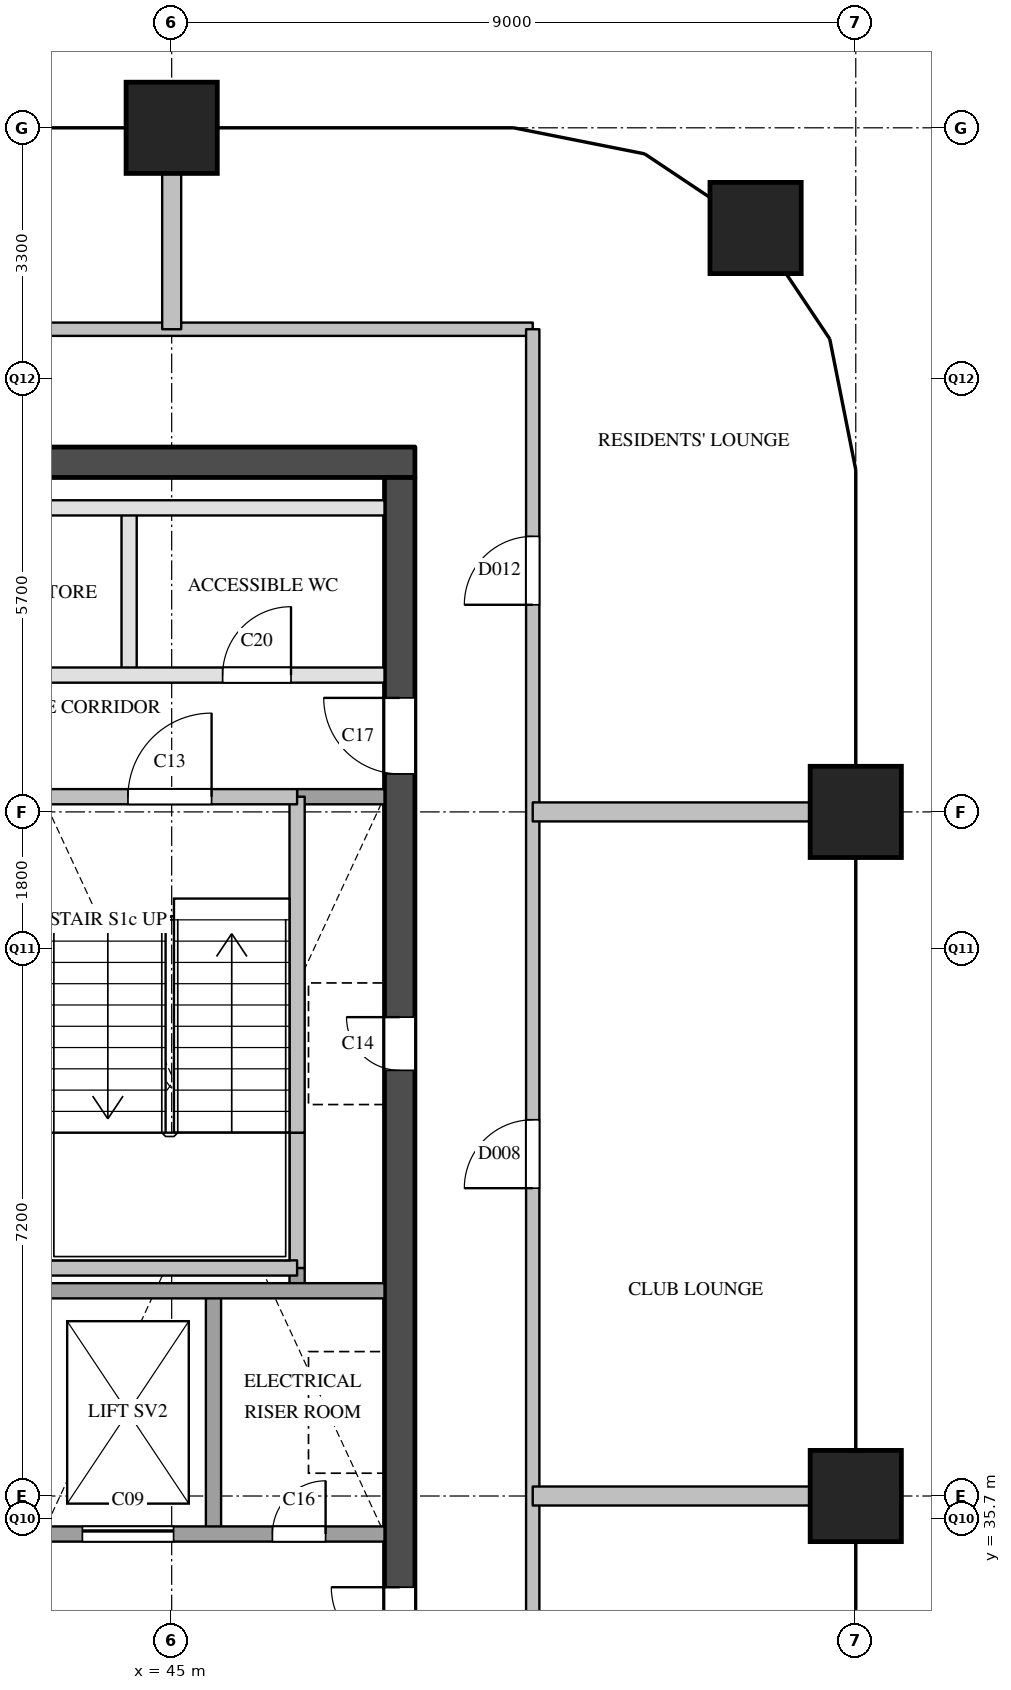
"""IFC4 building model, lengths in metres.
Left out: names, types, materials, properties, quantities, classifications, styles, units other than length and angle.
Written with IfcOpenShell. Run it as: python <this file> out.ifc"""

import sys

from ifc_helpers import new_model, si_unit, direction, frame, frame_2d, origin, origin_2d, place, context, subcontext, project, spatial, rectangle, extrude, element, fill, save


model = new_model("IFC4")
c1 = context("Model", 3, precision=1e-05, world=origin(), true_north=direction((0.0, 1.0)))
c2 = subcontext(c1, "Body", "Model", "MODEL_VIEW")
j1 = project(units=[si_unit("LENGTHUNIT", "METRE"), si_unit("PLANEANGLEUNIT", "RADIAN")], contexts=[c1])
p1 = place(None, origin())
s1 = spatial("IfcSite", under=j1, at=p1, CompositionType="ELEMENT")
p2 = place(p1, origin())
s2 = spatial("IfcBuilding", under=s1, at=p2, CompositionType="ELEMENT")
p3 = place(p2, frame((0.0, 0.0, 230.6)))
s3 = spatial("IfcBuildingStorey", under=s2, at=p3, CompositionType="ELEMENT", Elevation=230.6)
for number, where, z_axis, x_axis in (
    (1, (45.0, 54.0, 0.0), (0.0, 0.0, 1.0), (1.0, 0.0, 0.0)),
    (2, (54.0, 36.0, 0.0), (0.0, 0.0, 1.0), (1.0, 0.0, 0.0)),
    (3, (54.0, 45.0, 0.0), (0.0, 0.0, 1.0), (1.0, 0.0, 0.0)),
    (4, (52.682, 52.682, 0.0), (0.0, 0.0, 1.0), (1.0, 0.0, 0.0)),
):
    element("IfcColumn", number, at=place(p3, frame(where, z_axis=z_axis, x_axis=x_axis)), inside=s3, PredefinedType="COLUMN", context=c2, shape_type="SweptSolid", body=[
        extrude(rectangle(XDim=1.2, YDim=1.2, at=origin_2d()), origin(), (0.0, 0.0, 1.0), 3.9),
    ])
p4 = place(p3, frame((36.2, 49.6, 0.0), z_axis=(0.0, 0.0, 1.0), x_axis=(1.0, 0.0, 0.0)))
e5 = element("IfcWall", 5, at=p4, inside=s3, PredefinedType="SHEAR", context=c2, shape_type="SweptSolid", body=[
    extrude(rectangle(XDim=12.0, YDim=0.4, at=frame_2d((6.0, 0.0))), origin(), (0.0, 0.0, 1.0), 3.6),
])
p5 = place(p3, frame((48.0, 29.1, 0.0), z_axis=(0.0, 0.0, 1.0), x_axis=(0.0, 1.0, 0.0)))
e6 = element("IfcWall", 6, at=p5, inside=s3, PredefinedType="SHEAR", context=c2, shape_type="SweptSolid", body=[
    extrude(rectangle(XDim=20.3, YDim=0.4, at=frame_2d((10.15, 0.0))), origin(), (0.0, 0.0, 1.0), 3.6),
])
p6 = place(p5, frame((12.5, 0.0, 0.0)))
e7 = element("IfcOpeningElement", 7, at=p6, cuts=e6, PredefinedType="OPENING", context=c2, shape_type="SweptSolid", body=[
    extrude(rectangle(XDim=0.7, YDim=2.1, at=frame_2d((0.35, 1.05))), frame((0.0, 0.21, 0.0), z_axis=(0.0, -1.0, 0.0), x_axis=(1.0, 0.0, 0.0)), (0.0, 0.0, 1.0), 0.42),
])
p7 = place(p5, frame((3.9, 0.0, 0.0)))
e8 = element("IfcOpeningElement", 8, at=p7, cuts=e6, PredefinedType="OPENING", context=c2, shape_type="SweptSolid", body=[
    extrude(rectangle(XDim=1.8, YDim=2.1, at=frame_2d((0.9, 1.05))), frame((0.0, 0.21, 0.0), z_axis=(0.0, -1.0, 0.0), x_axis=(1.0, 0.0, 0.0)), (0.0, 0.0, 1.0), 0.42),
])
p8 = place(p5, frame((16.4, 0.0, 0.0)))
e9 = element("IfcOpeningElement", 9, at=p8, cuts=e6, PredefinedType="OPENING", context=c2, shape_type="SweptSolid", body=[
    extrude(rectangle(XDim=1.0, YDim=2.1, at=frame_2d((0.5, 1.05))), frame((0.0, 0.21, 0.0), z_axis=(0.0, -1.0, 0.0), x_axis=(1.0, 0.0, 0.0)), (0.0, 0.0, 1.0), 0.42),
])
p9 = place(p3, frame((44.44, 46.8, 0.0), z_axis=(0.0, 0.0, 1.0), x_axis=(0.0, 1.0, 0.0)))
e10 = element("IfcWall", 10, at=p9, inside=s3, PredefinedType="PARTITIONING", context=c2, shape_type="SweptSolid", body=[
    extrude(rectangle(XDim=2.2, YDim=0.2, at=frame_2d((1.1, 0.0))), origin(), (0.0, 0.0, 1.0), 3.6),
])
p10 = place(p3, frame((45.55, 35.5, 0.0), z_axis=(0.0, 0.0, 1.0), x_axis=(0.0, 1.0, 0.0)))
e11 = element("IfcWall", 11, at=p10, inside=s3, PredefinedType="SOLIDWALL", context=c2, shape_type="SweptSolid", body=[
    extrude(rectangle(XDim=3.2, YDim=0.2, at=frame_2d((1.6, 0.0))), origin(), (0.0, 0.0, 1.0), 3.6),
])
p11 = place(p3, frame((46.65, 38.7, 0.0), z_axis=(0.0, 0.0, 1.0), x_axis=(0.0, 1.0, 0.0)))
e12 = element("IfcWall", 12, at=p11, inside=s3, PredefinedType="SOLIDWALL", context=c2, shape_type="SweptSolid", body=[
    extrude(rectangle(XDim=0.3, YDim=0.2, at=frame_2d((0.15, 0.0))), origin(), (0.0, 0.0, 1.0), 3.6),
])
p12 = place(p3, frame((46.65, 39.0, 0.0), z_axis=(0.0, 0.0, 1.0), x_axis=(0.0, 1.0, 0.0)))
e13 = element("IfcWall", 13, at=p12, inside=s3, PredefinedType="SOLIDWALL", context=c2, shape_type="SweptSolid", body=[
    extrude(rectangle(XDim=1.78, YDim=0.2, at=frame_2d((0.89, 0.0))), origin(), (0.0, 0.0, 1.0), 3.6),
])
p13 = place(p3, frame((46.65, 40.78, 0.0), z_axis=(0.0, 0.0, 1.0), x_axis=(0.0, 1.0, 0.0)))
e14 = element("IfcWall", 14, at=p13, inside=s3, PredefinedType="SOLIDWALL", context=c2, shape_type="SweptSolid", body=[
    extrude(rectangle(XDim=4.42, YDim=0.2, at=frame_2d((2.21, 0.0))), origin(), (0.0, 0.0, 1.0), 3.6),
])
p14 = place(p3, frame((43.3, 35.5, 0.0), z_axis=(0.0, 0.0, 1.0), x_axis=(1.0, 0.0, 0.0)))
e15 = element("IfcWall", 15, at=p14, inside=s3, PredefinedType="SOLIDWALL", context=c2, shape_type="SweptSolid", body=[
    extrude(rectangle(XDim=4.5, YDim=0.2, at=frame_2d((2.25, 0.0))), origin(), (0.0, 0.0, 1.0), 3.6),
])
p15 = place(p14, frame((0.525, 0.0, 0.0)))
e16 = element("IfcOpeningElement", 16, at=p15, cuts=e15, PredefinedType="OPENING", context=c2, shape_type="SweptSolid", body=[
    extrude(rectangle(XDim=1.2, YDim=2.1, at=frame_2d((0.6, 1.05))), frame((0.0, 0.11, 0.0), z_axis=(0.0, -1.0, 0.0), x_axis=(1.0, 0.0, 0.0)), (0.0, 0.0, 1.0), 0.22),
])
p16 = place(p14, frame((3.025, 0.0, 0.0)))
e17 = element("IfcOpeningElement", 17, at=p16, cuts=e15, PredefinedType="OPENING", context=c2, shape_type="SweptSolid", body=[
    extrude(rectangle(XDim=0.7, YDim=2.1, at=frame_2d((0.35, 1.05))), frame((0.0, 0.11, 0.0), z_axis=(0.0, -1.0, 0.0), x_axis=(1.0, 0.0, 0.0)), (0.0, 0.0, 1.0), 0.22),
])
p17 = place(p3, frame((43.3, 38.7, 0.0), z_axis=(0.0, 0.0, 1.0), x_axis=(1.0, 0.0, 0.0)))
e18 = element("IfcWall", 18, at=p17, inside=s3, PredefinedType="SOLIDWALL", context=c2, shape_type="SweptSolid", body=[
    extrude(rectangle(XDim=4.5, YDim=0.2, at=frame_2d((2.25, 0.0))), origin(), (0.0, 0.0, 1.0), 3.6),
])
p18 = place(p3, frame((43.4, 39.0, 0.0), z_axis=(0.0, 0.0, 1.0), x_axis=(1.0, 0.0, 0.0)))
e19 = element("IfcWall", 19, at=p18, inside=s3, PredefinedType="SOLIDWALL", context=c2, shape_type="SweptSolid", body=[
    extrude(rectangle(XDim=3.25, YDim=0.2, at=frame_2d((1.625, 0.0))), origin(), (0.0, 0.0, 1.0), 3.6),
])
p19 = place(p3, frame((46.65, 45.2, 0.0), z_axis=(0.0, 0.0, 1.0), x_axis=(1.0, 0.0, 0.0)))
e20 = element("IfcWall", 20, at=p19, inside=s3, PredefinedType="SOLIDWALL", context=c2, shape_type="SweptSolid", body=[
    extrude(rectangle(XDim=1.15, YDim=0.2, at=frame_2d((0.575, 0.0))), origin(), (0.0, 0.0, 1.0), 3.6),
])
p20 = place(p3, frame((36.6, 45.2, 0.0), z_axis=(0.0, 0.0, 1.0), x_axis=(1.0, 0.0, 0.0)))
e21 = element("IfcWall", 21, at=p20, inside=s3, PredefinedType="SOLIDWALL", context=c2, shape_type="SweptSolid", body=[
    extrude(rectangle(XDim=10.05, YDim=0.2, at=frame_2d((5.025, 0.0))), origin(), (0.0, 0.0, 1.0), 3.6),
])
p21 = place(p20, frame((1.125, 0.0, 0.0)))
e22 = element("IfcOpeningElement", 22, at=p21, cuts=e21, PredefinedType="OPENING", context=c2, shape_type="SweptSolid", body=[
    extrude(rectangle(XDim=1.1, YDim=2.1, at=frame_2d((0.55, 1.05))), frame((0.0, 0.11, 0.0), z_axis=(0.0, -1.0, 0.0), x_axis=(1.0, 0.0, 0.0)), (0.0, 0.0, 1.0), 0.22),
])
p22 = place(p20, frame((4.475, 0.0, 0.0)))
e23 = element("IfcOpeningElement", 23, at=p22, cuts=e21, PredefinedType="OPENING", context=c2, shape_type="SweptSolid", body=[
    extrude(rectangle(XDim=1.1, YDim=2.1, at=frame_2d((0.55, 1.05))), frame((0.0, 0.11, 0.0), z_axis=(0.0, -1.0, 0.0), x_axis=(1.0, 0.0, 0.0)), (0.0, 0.0, 1.0), 0.22),
])
p23 = place(p20, frame((7.825, 0.0, 0.0)))
e24 = element("IfcOpeningElement", 24, at=p23, cuts=e21, PredefinedType="OPENING", context=c2, shape_type="SweptSolid", body=[
    extrude(rectangle(XDim=1.1, YDim=2.1, at=frame_2d((0.55, 1.05))), frame((0.0, 0.11, 0.0), z_axis=(0.0, -1.0, 0.0), x_axis=(1.0, 0.0, 0.0)), (0.0, 0.0, 1.0), 0.22),
])
p24 = place(p3, frame((36.6, 46.8, 0.0), z_axis=(0.0, 0.0, 1.0), x_axis=(1.0, 0.0, 0.0)))
e25 = element("IfcWall", 25, at=p24, inside=s3, PredefinedType="PARTITIONING", context=c2, shape_type="SweptSolid", body=[
    extrude(rectangle(XDim=11.2, YDim=0.2, at=frame_2d((5.6, 0.0))), origin(), (0.0, 0.0, 1.0), 3.6),
])
p25 = place(p24, frame((0.67, 0.0, 0.0)))
e26 = element("IfcOpeningElement", 26, at=p25, cuts=e25, PredefinedType="OPENING", context=c2, shape_type="SweptSolid", body=[
    extrude(rectangle(XDim=0.9, YDim=2.1, at=frame_2d((0.45, 1.05))), frame((0.0, 0.11, 0.0), z_axis=(0.0, -1.0, 0.0), x_axis=(1.0, 0.0, 0.0)), (0.0, 0.0, 1.0), 0.22),
])
p26 = place(p24, frame((4.59, 0.0, 0.0)))
e27 = element("IfcOpeningElement", 27, at=p26, cuts=e25, PredefinedType="OPENING", context=c2, shape_type="SweptSolid", body=[
    extrude(rectangle(XDim=0.9, YDim=2.1, at=frame_2d((0.45, 1.05))), frame((0.0, 0.11, 0.0), z_axis=(0.0, -1.0, 0.0), x_axis=(1.0, 0.0, 0.0)), (0.0, 0.0, 1.0), 0.22),
])
p27 = place(p24, frame((9.07, 0.0, 0.0)))
e28 = element("IfcOpeningElement", 28, at=p27, cuts=e25, PredefinedType="OPENING", context=c2, shape_type="SweptSolid", body=[
    extrude(rectangle(XDim=0.9, YDim=2.1, at=frame_2d((0.45, 1.05))), frame((0.0, 0.11, 0.0), z_axis=(0.0, -1.0, 0.0), x_axis=(1.0, 0.0, 0.0)), (0.0, 0.0, 1.0), 0.22),
])
p28 = place(p3, frame((36.6, 49.0, 0.0), z_axis=(0.0, 0.0, 1.0), x_axis=(1.0, 0.0, 0.0)))
e29 = element("IfcWall", 29, at=p28, inside=s3, PredefinedType="PARTITIONING", context=c2, shape_type="SweptSolid", body=[
    extrude(rectangle(XDim=11.2, YDim=0.2, at=frame_2d((5.6, 0.0))), origin(), (0.0, 0.0, 1.0), 3.6),
])
p29 = place(p3, frame((34.65, 51.35, 0.0), z_axis=(0.0, 0.0, 1.0), x_axis=(1.0, 0.0, 0.0)))
e30 = element("IfcWall", 30, at=p29, inside=s3, PredefinedType="PARTITIONING", context=c2, shape_type="SweptSolid", body=[
    extrude(rectangle(XDim=15.1, YDim=0.175, at=frame_2d((7.55, 0.0))), origin(), (0.0, 0.0, 1.0), 3.6),
])
p30 = place(p29, frame((5.4, 0.0, 0.0)))
e31 = element("IfcOpeningElement", 31, at=p30, cuts=e30, PredefinedType="OPENING", context=c2, shape_type="SweptSolid", body=[
    extrude(rectangle(XDim=0.9, YDim=2.1, at=frame_2d((0.45, 1.05))), frame((0.0, 0.097, 0.0), z_axis=(0.0, -1.0, 0.0), x_axis=(1.0, 0.0, 0.0)), (0.0, 0.0, 1.0), 0.195),
])
p31 = place(p3, frame((49.75, 28.5, 0.0), z_axis=(0.0, 0.0, 1.0), x_axis=(0.0, 1.0, 0.0)))
e32 = element("IfcWall", 32, at=p31, inside=s3, PredefinedType="PARTITIONING", context=c2, shape_type="SweptSolid", body=[
    extrude(rectangle(XDim=22.85, YDim=0.175, at=frame_2d((11.425, 0.0))), origin(), (0.0, 0.0, 1.0), 3.6),
])
p32 = place(p31, frame((3.3, 0.0, 0.0)))
e33 = element("IfcOpeningElement", 33, at=p32, cuts=e32, PredefinedType="OPENING", context=c2, shape_type="SweptSolid", body=[
    extrude(rectangle(XDim=0.9, YDim=2.1, at=frame_2d((0.45, 1.05))), frame((0.0, 0.097, 0.0), z_axis=(0.0, -1.0, 0.0), x_axis=(1.0, 0.0, 0.0)), (0.0, 0.0, 1.0), 0.195),
])
p33 = place(p31, frame((11.55, 0.0, 0.0)))
e34 = element("IfcOpeningElement", 34, at=p33, cuts=e32, PredefinedType="OPENING", context=c2, shape_type="SweptSolid", body=[
    extrude(rectangle(XDim=0.9, YDim=2.1, at=frame_2d((0.45, 1.05))), frame((0.0, 0.097, 0.0), z_axis=(0.0, -1.0, 0.0), x_axis=(1.0, 0.0, 0.0)), (0.0, 0.0, 1.0), 0.195),
])
p34 = place(p31, frame((19.225, 0.0, 0.0)))
e35 = element("IfcOpeningElement", 35, at=p34, cuts=e32, PredefinedType="OPENING", context=c2, shape_type="SweptSolid", body=[
    extrude(rectangle(XDim=0.9, YDim=2.1, at=frame_2d((0.45, 1.05))), frame((0.0, 0.097, 0.0), z_axis=(0.0, -1.0, 0.0), x_axis=(1.0, 0.0, 0.0)), (0.0, 0.0, 1.0), 0.195),
])
for number, where, z_axis, x_axis in (
    (36, (49.75, 36.0, 0.0), (0.0, 0.0, 1.0), (1.0, 0.0, 0.0)),
    (37, (49.75, 45.0, 0.0), (0.0, 0.0, 1.0), (1.0, 0.0, 0.0)),
):
    element("IfcWall", number, at=place(p3, frame(where, z_axis=z_axis, x_axis=x_axis)), inside=s3, PredefinedType="PARTITIONING", context=c2, shape_type="SweptSolid", body=[
        extrude(rectangle(XDim=4.25, YDim=0.25, at=frame_2d((2.125, 0.0))), origin(), (0.0, 0.0, 1.0), 3.6),
    ])
p35 = place(p3, frame((45.0, 51.35, 0.0), z_axis=(0.0, 0.0, 1.0), x_axis=(0.0, 1.0, 0.0)))
e38 = element("IfcWall", 38, at=p35, inside=s3, PredefinedType="PARTITIONING", context=c2, shape_type="SweptSolid", body=[
    extrude(rectangle(XDim=2.65, YDim=0.25, at=frame_2d((1.325, 0.0))), origin(), (0.0, 0.0, 1.0), 3.6),
])
p36 = place(p15, origin())
e39 = element("IfcDoor", 39, at=p36, inside=s3, OperationType="SLIDING_TO_LEFT", PredefinedType="DOOR", context=c2, shape_type="SweptSolid", body=[
    extrude(rectangle(XDim=1.2, YDim=2.1, at=frame_2d((0.6, 1.05))), frame((0.0, 0.025, 0.0), z_axis=(0.0, -1.0, 0.0), x_axis=(1.0, 0.0, 0.0)), (0.0, 0.0, 1.0), 0.05),
])
fill(e16, e39)
p37 = place(p23, origin())
e40 = element("IfcDoor", 40, at=p37, inside=s3, OperationType="SINGLE_SWING_RIGHT", PredefinedType="DOOR", context=c2, shape_type="SweptSolid", body=[
    extrude(rectangle(XDim=1.1, YDim=2.1, at=frame_2d((0.55, 1.05))), frame((0.0, 0.025, 0.0), z_axis=(0.0, -1.0, 0.0), x_axis=(1.0, 0.0, 0.0)), (0.0, 0.0, 1.0), 0.05),
])
fill(e24, e40)
p38 = place(p6, origin())
e41 = element("IfcDoor", 41, at=p38, inside=s3, OperationType="SINGLE_SWING_RIGHT", PredefinedType="DOOR", context=c2, shape_type="SweptSolid", body=[
    extrude(rectangle(XDim=0.7, YDim=2.1, at=frame_2d((0.35, 1.05))), frame((0.0, 0.025, 0.0), z_axis=(0.0, -1.0, 0.0), x_axis=(1.0, 0.0, 0.0)), (0.0, 0.0, 1.0), 0.05),
])
fill(e7, e41)
p39 = place(p7, origin())
e42 = element("IfcDoor", 42, at=p39, inside=s3, OperationType="DOUBLE_DOOR_SINGLE_SWING", PredefinedType="DOOR", context=c2, shape_type="SweptSolid", body=[
    extrude(rectangle(XDim=1.8, YDim=2.1, at=frame_2d((0.9, 1.05))), frame((0.0, 0.025, 0.0), z_axis=(0.0, -1.0, 0.0), x_axis=(1.0, 0.0, 0.0)), (0.0, 0.0, 1.0), 0.05),
])
fill(e8, e42)
p40 = place(p16, origin())
e43 = element("IfcDoor", 43, at=p40, inside=s3, OperationType="SINGLE_SWING_RIGHT", PredefinedType="DOOR", context=c2, shape_type="SweptSolid", body=[
    extrude(rectangle(XDim=0.7, YDim=2.1, at=frame_2d((0.35, 1.05))), frame((0.0, 0.025, 0.0), z_axis=(0.0, -1.0, 0.0), x_axis=(1.0, 0.0, 0.0)), (0.0, 0.0, 1.0), 0.05),
])
fill(e17, e43)
p41 = place(p8, origin())
e44 = element("IfcDoor", 44, at=p41, inside=s3, OperationType="SINGLE_SWING_RIGHT", PredefinedType="DOOR", context=c2, shape_type="SweptSolid", body=[
    extrude(rectangle(XDim=1.0, YDim=2.1, at=frame_2d((0.5, 1.05))), frame((0.0, 0.025, 0.0), z_axis=(0.0, -1.0, 0.0), x_axis=(1.0, 0.0, 0.0)), (0.0, 0.0, 1.0), 0.05),
])
fill(e9, e44)
p42 = place(p27, origin())
e45 = element("IfcDoor", 45, at=p42, inside=s3, OperationType="SINGLE_SWING_RIGHT", PredefinedType="DOOR", context=c2, shape_type="SweptSolid", body=[
    extrude(rectangle(XDim=0.9, YDim=2.1, at=frame_2d((0.45, 1.05))), frame((0.0, 0.025, 0.0), z_axis=(0.0, -1.0, 0.0), x_axis=(1.0, 0.0, 0.0)), (0.0, 0.0, 1.0), 0.05),
])
fill(e28, e45)
p43 = place(p33, origin())
e46 = element("IfcDoor", 46, at=p43, inside=s3, OperationType="SINGLE_SWING_LEFT", PredefinedType="DOOR", context=c2, shape_type="SweptSolid", body=[
    extrude(rectangle(XDim=0.9, YDim=2.1, at=frame_2d((0.45, 1.05))), frame((0.0, 0.025, 0.0), z_axis=(0.0, -1.0, 0.0), x_axis=(1.0, 0.0, 0.0)), (0.0, 0.0, 1.0), 0.05),
])
fill(e34, e46)
p44 = place(p34, origin())
e47 = element("IfcDoor", 47, at=p44, inside=s3, OperationType="SINGLE_SWING_LEFT", PredefinedType="DOOR", context=c2, shape_type="SweptSolid", body=[
    extrude(rectangle(XDim=0.9, YDim=2.1, at=frame_2d((0.45, 1.05))), frame((0.0, 0.025, 0.0), z_axis=(0.0, -1.0, 0.0), x_axis=(1.0, 0.0, 0.0)), (0.0, 0.0, 1.0), 0.05),
])
fill(e35, e47)
save(model, sys.argv[1])
